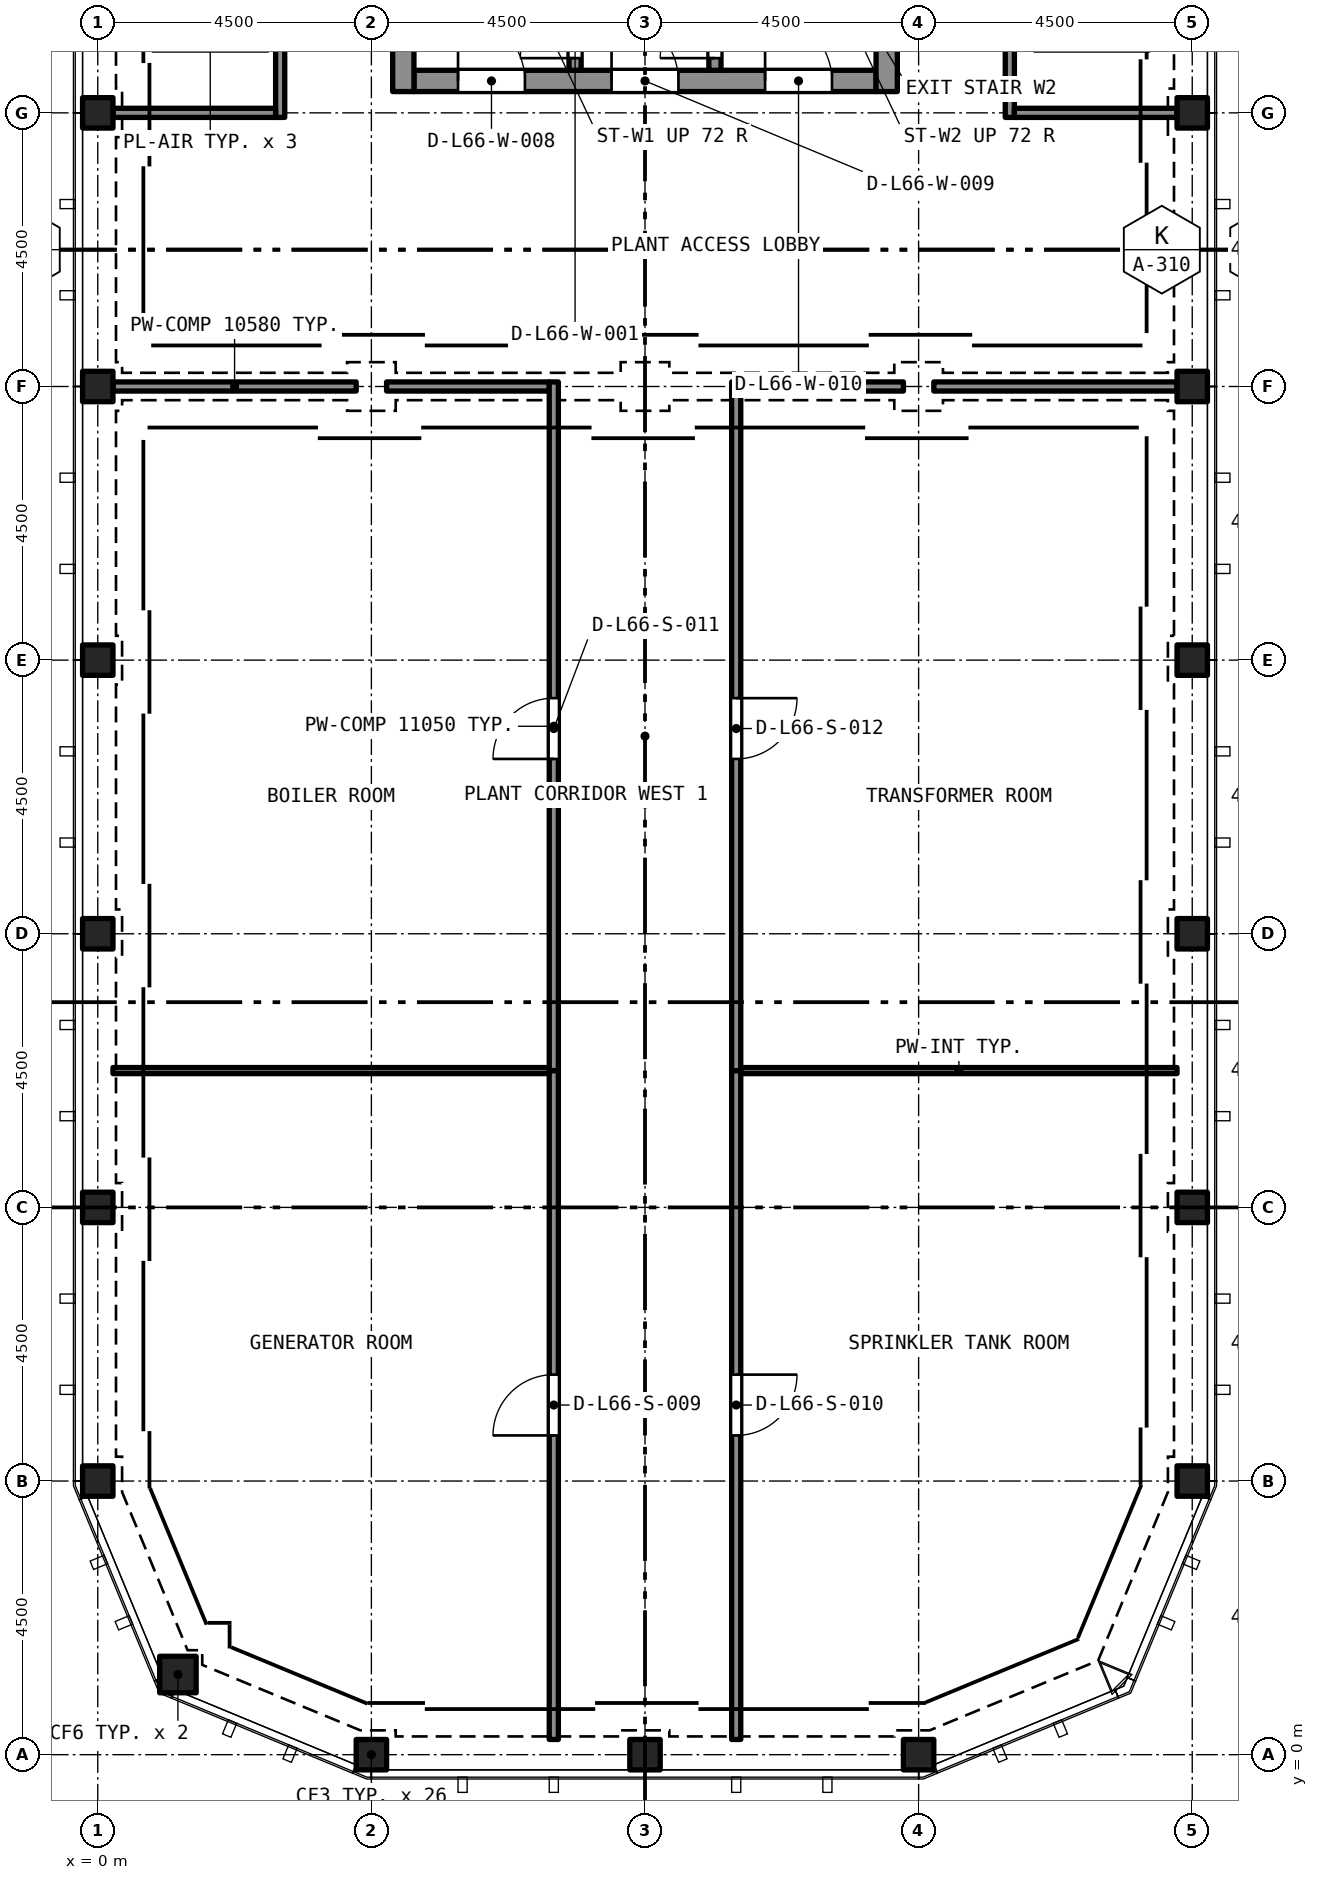
"""IFC4 building model, lengths in metres.
Left out: names, types, materials, properties, quantities, classifications, styles, units other than length and angle.
Written with IfcOpenShell. Run it as: python <this file> out.ifc"""

import sys

from ifc_helpers import new_model, si_unit, direction, frame, frame_2d, origin, origin_2d, place, context, subcontext, project, spatial, rectangle, hollow_rectangle, extrude, element, fill, save


model = new_model("IFC4")
c1 = context("Model", 3, precision=1e-05, world=origin(), true_north=direction((0.0, 1.0)))
c2 = subcontext(c1, "Body", "Model", "MODEL_VIEW")
j1 = project(units=[si_unit("LENGTHUNIT", "METRE"), si_unit("PLANEANGLEUNIT", "RADIAN")], contexts=[c1])
p1 = place(None, origin())
s1 = spatial("IfcSite", under=j1, at=p1, CompositionType="ELEMENT")
p2 = place(p1, origin())
s2 = spatial("IfcBuilding", under=s1, at=p2, CompositionType="ELEMENT")
p3 = place(p2, frame((0.0, 0.0, 235.695)))
s3 = spatial("IfcBuildingStorey", under=s2, at=p3, CompositionType="ELEMENT", Elevation=235.695)
p4 = place(p3, frame((5.2, 27.525, 0.0), z_axis=(0.0, 0.0, 1.0), x_axis=(1.0, 0.0, 0.0)))
e1 = element("IfcWall", 1, at=p4, inside=s3, PredefinedType="SOLIDWALL", context=c2, shape_type="SweptSolid", body=[
    extrude(rectangle(XDim=7.6, YDim=0.35, at=frame_2d((3.8, 0.0))), origin(), (0.0, 0.0, 1.0), 11.4),
])
p5 = place(p4, frame((0.725, 0.0, 0.0)))
e2 = element("IfcOpeningElement", 2, at=p5, cuts=e1, PredefinedType="OPENING", context=c2, shape_type="SweptSolid", body=[
    extrude(rectangle(XDim=1.1, YDim=2.1, at=frame_2d((0.55, 1.05))), frame((0.0, 0.185, 0.0), z_axis=(0.0, -1.0, 0.0), x_axis=(1.0, 0.0, 0.0)), (0.0, 0.0, 1.0), 0.37),
])
p6 = place(p4, frame((3.25, 0.0, 0.0)))
e3 = element("IfcOpeningElement", 3, at=p6, cuts=e1, PredefinedType="OPENING", context=c2, shape_type="SweptSolid", body=[
    extrude(rectangle(XDim=1.1, YDim=2.1, at=frame_2d((0.55, 1.05))), frame((0.0, 0.185, 0.0), z_axis=(0.0, -1.0, 0.0), x_axis=(1.0, 0.0, 0.0)), (0.0, 0.0, 1.0), 0.37),
])
p7 = place(p4, frame((5.775, 0.0, 0.0)))
e4 = element("IfcOpeningElement", 4, at=p7, cuts=e1, PredefinedType="OPENING", context=c2, shape_type="SweptSolid", body=[
    extrude(rectangle(XDim=1.1, YDim=2.1, at=frame_2d((0.55, 1.05))), frame((0.0, 0.185, 0.0), z_axis=(0.0, -1.0, 0.0), x_axis=(1.0, 0.0, 0.0)), (0.0, 0.0, 1.0), 0.37),
])
p8 = place(p3, frame((5.025, 27.35, 0.0), z_axis=(0.0, 0.0, 1.0), x_axis=(0.0, 1.0, 0.0)))
e5 = element("IfcWall", 5, at=p8, inside=s3, PredefinedType="SOLIDWALL", context=c2, shape_type="SweptSolid", body=[
    extrude(rectangle(XDim=12.8, YDim=0.35, at=frame_2d((6.4, 0.0))), origin(), (0.0, 0.0, 1.0), 11.4),
])
p9 = place(p8, frame((8.6, 0.0, 0.0)))
e6 = element("IfcOpeningElement", 6, at=p9, cuts=e5, PredefinedType="OPENING", context=c2, shape_type="SweptSolid", body=[
    extrude(rectangle(XDim=1.2, YDim=2.1, at=frame_2d((0.6, 1.05))), frame((0.0, 0.185, 0.0), z_axis=(0.0, -1.0, 0.0), x_axis=(1.0, 0.0, 0.0)), (0.0, 0.0, 1.0), 0.37),
])
p10 = place(p3, frame((12.975, 27.35, 0.0), z_axis=(0.0, 0.0, 1.0), x_axis=(0.0, 1.0, 0.0)))
e7 = element("IfcWall", 7, at=p10, inside=s3, PredefinedType="SOLIDWALL", context=c2, shape_type="SweptSolid", body=[
    extrude(rectangle(XDim=12.8, YDim=0.35, at=frame_2d((6.4, 0.0))), origin(), (0.0, 0.0, 1.0), 11.4),
])
p11 = place(p10, frame((10.75, 0.0, 0.0)))
e8 = element("IfcOpeningElement", 8, at=p11, cuts=e7, PredefinedType="OPENING", context=c2, shape_type="SweptSolid", body=[
    extrude(rectangle(XDim=1.1, YDim=2.1, at=frame_2d((0.55, 1.05))), frame((0.0, 0.185, 0.0), z_axis=(0.0, -1.0, 0.0), x_axis=(1.0, 0.0, 0.0)), (0.0, 0.0, 1.0), 0.37),
])
p12 = place(p10, frame((8.6, 0.0, 0.0)))
e9 = element("IfcOpeningElement", 9, at=p12, cuts=e7, PredefinedType="OPENING", context=c2, shape_type="SweptSolid", body=[
    extrude(rectangle(XDim=1.2, YDim=2.1, at=frame_2d((0.6, 1.05))), frame((0.0, 0.185, 0.0), z_axis=(0.0, -1.0, 0.0), x_axis=(1.0, 0.0, 0.0)), (0.0, 0.0, 1.0), 0.37),
])
for number, where, z_axis, x_axis in (
    (10, (4.5, 0.0, 0.0), (0.0, 0.0, 1.0), (1.0, 0.0, 0.0)),
    (11, (9.0, 0.0, 0.0), (0.0, 0.0, 1.0), (1.0, 0.0, 0.0)),
    (12, (13.5, 0.0, 0.0), (0.0, 0.0, 1.0), (1.0, 0.0, 0.0)),
):
    element("IfcColumn", number, at=place(p3, frame(where, z_axis=z_axis, x_axis=x_axis)), inside=s3, PredefinedType="COLUMN", context=c2, shape_type="SweptSolid", body=[
        extrude(hollow_rectangle(XDim=0.5, YDim=0.5, WallThickness=0.04, at=origin_2d()), origin(), (0.0, 0.0, 1.0), 11.4),
    ])
p13 = place(p3, frame((1.318, 1.318, 0.0), z_axis=(0.0, 0.0, 1.0), x_axis=(1.0, 0.0, 0.0)))
e13 = element("IfcColumn", 13, at=p13, inside=s3, PredefinedType="COLUMN", context=c2, shape_type="SweptSolid", body=[
    extrude(hollow_rectangle(XDim=0.6, YDim=0.6, WallThickness=0.05, at=origin_2d()), origin(), (0.0, 0.0, 1.0), 11.4),
])
for number, where, z_axis, x_axis in (
    (14, (0.0, 4.5, 0.0), (0.0, 0.0, 1.0), (1.0, 0.0, 0.0)),
    (15, (18.0, 4.5, 0.0), (0.0, 0.0, 1.0), (1.0, 0.0, 0.0)),
    (16, (0.0, 9.0, 0.0), (0.0, 0.0, 1.0), (1.0, 0.0, 0.0)),
    (17, (18.0, 9.0, 0.0), (0.0, 0.0, 1.0), (1.0, 0.0, 0.0)),
    (18, (0.0, 13.5, 0.0), (0.0, 0.0, 1.0), (1.0, 0.0, 0.0)),
    (19, (18.0, 13.5, 0.0), (0.0, 0.0, 1.0), (1.0, 0.0, 0.0)),
    (20, (0.0, 18.0, 0.0), (0.0, 0.0, 1.0), (1.0, 0.0, 0.0)),
    (21, (18.0, 18.0, 0.0), (0.0, 0.0, 1.0), (1.0, 0.0, 0.0)),
    (22, (0.0, 22.5, 0.0), (0.0, 0.0, 1.0), (1.0, 0.0, 0.0)),
    (23, (18.0, 22.5, 0.0), (0.0, 0.0, 1.0), (1.0, 0.0, 0.0)),
    (24, (0.0, 27.0, 0.0), (0.0, 0.0, 1.0), (1.0, 0.0, 0.0)),
    (25, (18.0, 27.0, 0.0), (0.0, 0.0, 1.0), (1.0, 0.0, 0.0)),
):
    element("IfcColumn", number, at=place(p3, frame(where, z_axis=z_axis, x_axis=x_axis)), inside=s3, PredefinedType="COLUMN", context=c2, shape_type="SweptSolid", body=[
        extrude(hollow_rectangle(XDim=0.5, YDim=0.5, WallThickness=0.04, at=origin_2d()), origin(), (0.0, 0.0, 1.0), 11.4),
    ])
p14 = place(p3, frame((7.85, 27.7, 0.0), z_axis=(0.0, 0.0, 1.0), x_axis=(0.0, 1.0, 0.0)))
e26 = element("IfcWall", 26, at=p14, inside=s3, PredefinedType="SOLIDWALL", context=c2, shape_type="SweptSolid", body=[
    extrude(rectangle(XDim=5.4, YDim=0.2, at=frame_2d((2.7, 0.0))), origin(), (0.0, 0.0, 1.0), 11.05),
])
p15 = place(p14, frame((0.2, 0.0, 0.0)))
e27 = element("IfcOpeningElement", 27, at=p15, cuts=e26, PredefinedType="OPENING", context=c2, shape_type="SweptSolid", body=[
    extrude(rectangle(XDim=0.9, YDim=2.1, at=frame_2d((0.45, 1.05))), frame((0.0, 0.11, 0.0), z_axis=(0.0, -1.0, 0.0), x_axis=(1.0, 0.0, 0.0)), (0.0, 0.0, 1.0), 0.22),
])
p16 = place(p3, frame((10.15, 27.7, 0.0), z_axis=(0.0, 0.0, 1.0), x_axis=(0.0, 1.0, 0.0)))
e28 = element("IfcWall", 28, at=p16, inside=s3, PredefinedType="SOLIDWALL", context=c2, shape_type="SweptSolid", body=[
    extrude(rectangle(XDim=5.4, YDim=0.2, at=frame_2d((2.7, 0.0))), origin(), (0.0, 0.0, 1.0), 11.05),
])
p17 = place(p16, frame((0.2, 0.0, 0.0)))
e29 = element("IfcOpeningElement", 29, at=p17, cuts=e28, PredefinedType="OPENING", context=c2, shape_type="SweptSolid", body=[
    extrude(rectangle(XDim=0.9, YDim=2.1, at=frame_2d((0.45, 1.05))), frame((0.0, 0.11, 0.0), z_axis=(0.0, -1.0, 0.0), x_axis=(1.0, 0.0, 0.0)), (0.0, 0.0, 1.0), 0.22),
])
p18 = place(p3, frame((15.0, 36.0, 0.0), z_axis=(0.0, 0.0, 1.0), x_axis=(0.0, -1.0, 0.0)))
e30 = element("IfcWall", 30, at=p18, inside=s3, PredefinedType="PARTITIONING", context=c2, shape_type="SweptSolid", body=[
    extrude(rectangle(XDim=9.075, YDim=0.15, at=frame_2d((4.538, 0.0))), origin(), (0.0, 0.0, 1.0), 11.05),
])
p19 = place(p18, frame((3.75, 0.0, 0.0)))
e31 = element("IfcOpeningElement", 31, at=p19, cuts=e30, PredefinedType="OPENING", context=c2, shape_type="SweptSolid", body=[
    extrude(rectangle(XDim=1.5, YDim=2.4, at=frame_2d((0.75, 1.2))), frame((0.0, 0.085, 0.0), z_axis=(0.0, -1.0, 0.0), x_axis=(1.0, 0.0, 0.0)), (0.0, 0.0, 1.0), 0.17),
])
p20 = place(p3, frame((3.0, 26.925, 0.0), z_axis=(0.0, 0.0, 1.0), x_axis=(0.0, 1.0, 0.0)))
e32 = element("IfcWall", 32, at=p20, inside=s3, PredefinedType="PARTITIONING", context=c2, shape_type="SweptSolid", body=[
    extrude(rectangle(XDim=9.075, YDim=0.15, at=frame_2d((4.538, 0.0))), origin(), (0.0, 0.0, 1.0), 11.05),
])
p21 = place(p20, frame((3.825, 0.0, 0.0)))
e33 = element("IfcOpeningElement", 33, at=p21, cuts=e32, PredefinedType="OPENING", context=c2, shape_type="SweptSolid", body=[
    extrude(rectangle(XDim=1.5, YDim=2.4, at=frame_2d((0.75, 1.2))), frame((0.0, 0.085, 0.0), z_axis=(0.0, -1.0, 0.0), x_axis=(1.0, 0.0, 0.0)), (0.0, 0.0, 1.0), 0.17),
])
for number, where, z_axis, x_axis in (
    (34, (15.075, 27.0, 0.0), (0.0, 0.0, 1.0), (1.0, 0.0, 0.0)),
    (35, (0.25, 27.0, 0.0), (0.0, 0.0, 1.0), (1.0, 0.0, 0.0)),
):
    element("IfcWall", number, at=place(p3, frame(where, z_axis=z_axis, x_axis=x_axis)), inside=s3, PredefinedType="PARTITIONING", context=c2, shape_type="SweptSolid", body=[
        extrude(rectangle(XDim=2.675, YDim=0.15, at=frame_2d((1.337, 0.0))), origin(), (0.0, 0.0, 1.0), 11.05),
    ])
p22 = place(p3, frame((4.75, 22.5, 0.0), z_axis=(0.0, 0.0, 1.0), x_axis=(1.0, 0.0, 0.0)))
e36 = element("IfcWall", 36, at=p22, inside=s3, PredefinedType="PARTITIONING", context=c2, shape_type="SweptSolid", body=[
    extrude(rectangle(XDim=2.675, YDim=0.15, at=frame_2d((1.337, 0.0))), origin(), (0.0, 0.0, 1.0), 10.58),
])
for number, where, z_axis, x_axis in (
    (37, (0.25, 22.5, 0.0), (0.0, 0.0, 1.0), (1.0, 0.0, 0.0)),
    (38, (13.75, 22.5, 0.0), (0.0, 0.0, 1.0), (1.0, 0.0, 0.0)),
):
    element("IfcWall", number, at=place(p3, frame(where, z_axis=z_axis, x_axis=x_axis)), inside=s3, PredefinedType="PARTITIONING", context=c2, shape_type="SweptSolid", body=[
        extrude(rectangle(XDim=4.0, YDim=0.15, at=frame_2d((2.0, 0.0))), origin(), (0.0, 0.0, 1.0), 10.58),
    ])
p23 = place(p3, frame((10.575, 22.5, 0.0), z_axis=(0.0, 0.0, 1.0), x_axis=(1.0, 0.0, 0.0)))
e39 = element("IfcWall", 39, at=p23, inside=s3, PredefinedType="PARTITIONING", context=c2, shape_type="SweptSolid", body=[
    extrude(rectangle(XDim=2.675, YDim=0.15, at=frame_2d((1.337, 0.0))), origin(), (0.0, 0.0, 1.0), 10.58),
])
p24 = place(p3, frame((0.25, 11.25, 0.0), z_axis=(0.0, 0.0, 1.0), x_axis=(1.0, 0.0, 0.0)))
e40 = element("IfcWall", 40, at=p24, inside=s3, PredefinedType="PARTITIONING", context=c2, shape_type="SweptSolid", body=[
    extrude(rectangle(XDim=7.175, YDim=0.1, at=frame_2d((3.587, 0.0))), origin(), (0.0, 0.0, 1.0), 11.05),
])
p25 = place(p3, frame((7.5, 0.25, 0.0), z_axis=(0.0, 0.0, 1.0), x_axis=(0.0, 1.0, 0.0)))
e41 = element("IfcWall", 41, at=p25, inside=s3, PredefinedType="PARTITIONING", context=c2, shape_type="SweptSolid", body=[
    extrude(rectangle(XDim=11.0, YDim=0.15, at=frame_2d((5.5, 0.0))), origin(), (0.0, 0.0, 1.0), 11.05),
])
p26 = place(p25, frame((5.0, 0.0, 0.0)))
e42 = element("IfcOpeningElement", 42, at=p26, cuts=e41, PredefinedType="OPENING", context=c2, shape_type="SweptSolid", body=[
    extrude(rectangle(XDim=1.0, YDim=2.1, at=frame_2d((0.5, 1.05))), frame((0.0, 0.085, 0.0), z_axis=(0.0, -1.0, 0.0), x_axis=(1.0, 0.0, 0.0)), (0.0, 0.0, 1.0), 0.17),
])
p27 = place(p3, frame((10.575, 11.25, 0.0), z_axis=(0.0, 0.0, 1.0), x_axis=(1.0, 0.0, 0.0)))
e43 = element("IfcWall", 43, at=p27, inside=s3, PredefinedType="PARTITIONING", context=c2, shape_type="SweptSolid", body=[
    extrude(rectangle(XDim=7.175, YDim=0.1, at=frame_2d((3.587, 0.0))), origin(), (0.0, 0.0, 1.0), 11.05),
])
p28 = place(p3, frame((10.5, 11.25, 0.0), z_axis=(0.0, 0.0, 1.0), x_axis=(0.0, -1.0, 0.0)))
e44 = element("IfcWall", 44, at=p28, inside=s3, PredefinedType="PARTITIONING", context=c2, shape_type="SweptSolid", body=[
    extrude(rectangle(XDim=11.0, YDim=0.15, at=frame_2d((5.5, 0.0))), origin(), (0.0, 0.0, 1.0), 11.05),
])
p29 = place(p28, frame((5.0, 0.0, 0.0)))
e45 = element("IfcOpeningElement", 45, at=p29, cuts=e44, PredefinedType="OPENING", context=c2, shape_type="SweptSolid", body=[
    extrude(rectangle(XDim=1.0, YDim=2.1, at=frame_2d((0.5, 1.05))), frame((0.0, 0.085, 0.0), z_axis=(0.0, -1.0, 0.0), x_axis=(1.0, 0.0, 0.0)), (0.0, 0.0, 1.0), 0.17),
])
p30 = place(p3, frame((7.5, 11.25, 0.0), z_axis=(0.0, 0.0, 1.0), x_axis=(0.0, 1.0, 0.0)))
e46 = element("IfcWall", 46, at=p30, inside=s3, PredefinedType="PARTITIONING", context=c2, shape_type="SweptSolid", body=[
    extrude(rectangle(XDim=11.325, YDim=0.15, at=frame_2d((5.663, 0.0))), origin(), (0.0, 0.0, 1.0), 11.05),
])
p31 = place(p30, frame((5.125, 0.0, 0.0)))
e47 = element("IfcOpeningElement", 47, at=p31, cuts=e46, PredefinedType="OPENING", context=c2, shape_type="SweptSolid", body=[
    extrude(rectangle(XDim=1.0, YDim=2.1, at=frame_2d((0.5, 1.05))), frame((0.0, 0.085, 0.0), z_axis=(0.0, -1.0, 0.0), x_axis=(1.0, 0.0, 0.0)), (0.0, 0.0, 1.0), 0.17),
])
p32 = place(p3, frame((10.5, 22.575, 0.0), z_axis=(0.0, 0.0, 1.0), x_axis=(0.0, -1.0, 0.0)))
e48 = element("IfcWall", 48, at=p32, inside=s3, PredefinedType="PARTITIONING", context=c2, shape_type="SweptSolid", body=[
    extrude(rectangle(XDim=11.325, YDim=0.15, at=frame_2d((5.663, 0.0))), origin(), (0.0, 0.0, 1.0), 11.05),
])
p33 = place(p32, frame((5.2, 0.0, 0.0)))
e49 = element("IfcOpeningElement", 49, at=p33, cuts=e48, PredefinedType="OPENING", context=c2, shape_type="SweptSolid", body=[
    extrude(rectangle(XDim=1.0, YDim=2.1, at=frame_2d((0.5, 1.05))), frame((0.0, 0.085, 0.0), z_axis=(0.0, -1.0, 0.0), x_axis=(1.0, 0.0, 0.0)), (0.0, 0.0, 1.0), 0.17),
])
p34 = place(p15, origin())
e50 = element("IfcDoor", 50, at=p34, inside=s3, OperationType="SINGLE_SWING_LEFT", PredefinedType="DOOR", context=c2, shape_type="SweptSolid", body=[
    extrude(rectangle(XDim=0.9, YDim=2.1, at=frame_2d((0.45, 1.05))), frame((0.0, 0.025, 0.0), z_axis=(0.0, -1.0, 0.0), x_axis=(1.0, 0.0, 0.0)), (0.0, 0.0, 1.0), 0.05),
])
fill(e27, e50)
p35 = place(p17, origin())
e51 = element("IfcDoor", 51, at=p35, inside=s3, OperationType="SINGLE_SWING_LEFT", PredefinedType="DOOR", context=c2, shape_type="SweptSolid", body=[
    extrude(rectangle(XDim=0.9, YDim=2.1, at=frame_2d((0.45, 1.05))), frame((0.0, 0.025, 0.0), z_axis=(0.0, -1.0, 0.0), x_axis=(1.0, 0.0, 0.0)), (0.0, 0.0, 1.0), 0.05),
])
fill(e29, e51)
p36 = place(p5, origin())
e52 = element("IfcDoor", 52, at=p36, inside=s3, OperationType="SINGLE_SWING_LEFT", PredefinedType="DOOR", context=c2, shape_type="SweptSolid", body=[
    extrude(rectangle(XDim=1.1, YDim=2.1, at=frame_2d((0.55, 1.05))), frame((0.0, 0.025, 0.0), z_axis=(0.0, -1.0, 0.0), x_axis=(1.0, 0.0, 0.0)), (0.0, 0.0, 1.0), 0.05),
])
fill(e2, e52)
p37 = place(p6, origin())
e53 = element("IfcDoor", 53, at=p37, inside=s3, OperationType="SINGLE_SWING_LEFT", PredefinedType="DOOR", context=c2, shape_type="SweptSolid", body=[
    extrude(rectangle(XDim=1.1, YDim=2.1, at=frame_2d((0.55, 1.05))), frame((0.0, 0.025, 0.0), z_axis=(0.0, -1.0, 0.0), x_axis=(1.0, 0.0, 0.0)), (0.0, 0.0, 1.0), 0.05),
])
fill(e3, e53)
p38 = place(p7, origin())
e54 = element("IfcDoor", 54, at=p38, inside=s3, OperationType="SINGLE_SWING_LEFT", PredefinedType="DOOR", context=c2, shape_type="SweptSolid", body=[
    extrude(rectangle(XDim=1.1, YDim=2.1, at=frame_2d((0.55, 1.05))), frame((0.0, 0.025, 0.0), z_axis=(0.0, -1.0, 0.0), x_axis=(1.0, 0.0, 0.0)), (0.0, 0.0, 1.0), 0.05),
])
fill(e4, e54)
p39 = place(p26, origin())
e55 = element("IfcDoor", 55, at=p39, inside=s3, OperationType="SINGLE_SWING_RIGHT", PredefinedType="DOOR", context=c2, shape_type="SweptSolid", body=[
    extrude(rectangle(XDim=1.0, YDim=2.1, at=frame_2d((0.5, 1.05))), frame((0.0, 0.025, 0.0), z_axis=(0.0, -1.0, 0.0), x_axis=(1.0, 0.0, 0.0)), (0.0, 0.0, 1.0), 0.05),
])
fill(e42, e55)
p40 = place(p29, origin())
e56 = element("IfcDoor", 56, at=p40, inside=s3, OperationType="SINGLE_SWING_RIGHT", PredefinedType="DOOR", context=c2, shape_type="SweptSolid", body=[
    extrude(rectangle(XDim=1.0, YDim=2.1, at=frame_2d((0.5, 1.05))), frame((0.0, 0.025, 0.0), z_axis=(0.0, -1.0, 0.0), x_axis=(1.0, 0.0, 0.0)), (0.0, 0.0, 1.0), 0.05),
])
fill(e45, e56)
p41 = place(p31, origin())
e57 = element("IfcDoor", 57, at=p41, inside=s3, OperationType="SINGLE_SWING_LEFT", PredefinedType="DOOR", context=c2, shape_type="SweptSolid", body=[
    extrude(rectangle(XDim=1.0, YDim=2.1, at=frame_2d((0.5, 1.05))), frame((0.0, 0.025, 0.0), z_axis=(0.0, -1.0, 0.0), x_axis=(1.0, 0.0, 0.0)), (0.0, 0.0, 1.0), 0.05),
])
fill(e47, e57)
p42 = place(p33, origin())
e58 = element("IfcDoor", 58, at=p42, inside=s3, OperationType="SINGLE_SWING_RIGHT", PredefinedType="DOOR", context=c2, shape_type="SweptSolid", body=[
    extrude(rectangle(XDim=1.0, YDim=2.1, at=frame_2d((0.5, 1.05))), frame((0.0, 0.025, 0.0), z_axis=(0.0, -1.0, 0.0), x_axis=(1.0, 0.0, 0.0)), (0.0, 0.0, 1.0), 0.05),
])
fill(e49, e58)
save(model, sys.argv[1])
